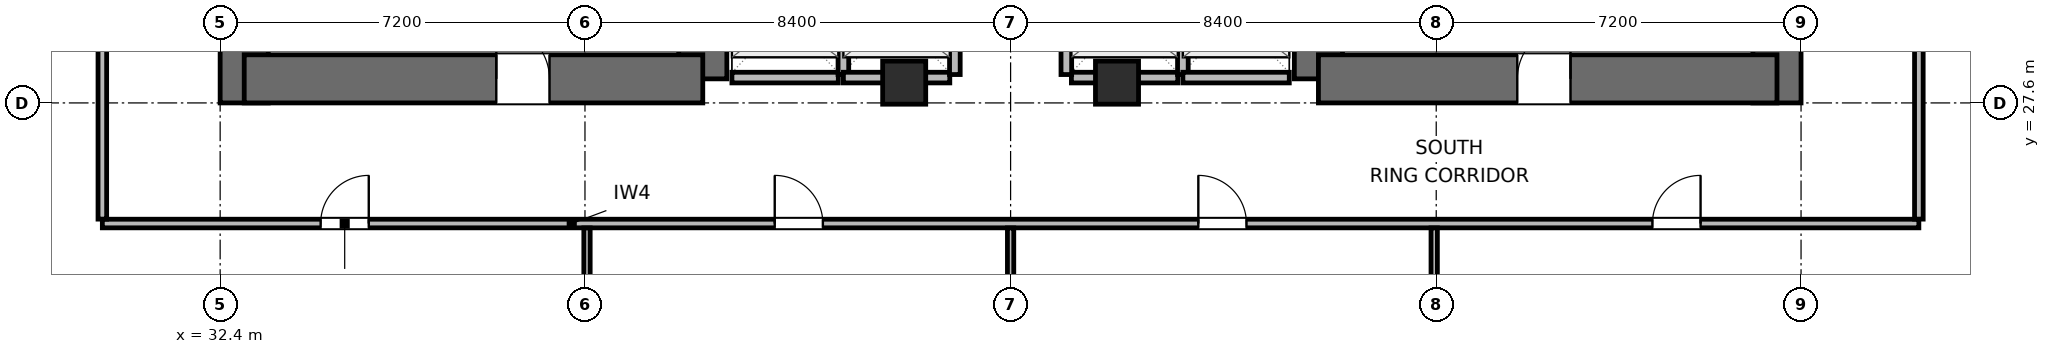
"""IFC4 building model, lengths in metres.
Left out: names, types, materials, properties, quantities, classifications, styles, units other than length and angle.
Written with IfcOpenShell. Run it as: python <this file> out.ifc"""

import sys

from ifc_helpers import new_model, si_unit, direction, frame, frame_2d, origin, origin_2d, place, context, subcontext, project, spatial, rectangle, extrude, element, fill, save


model = new_model("IFC4")
c1 = context("Model", 3, precision=1e-05, world=origin(), true_north=direction((0.0, 1.0)))
c2 = subcontext(c1, "Body", "Model", "MODEL_VIEW")
j1 = project(units=[si_unit("LENGTHUNIT", "METRE"), si_unit("PLANEANGLEUNIT", "RADIAN")], contexts=[c1])
p1 = place(None, origin())
s1 = spatial("IfcSite", under=j1, at=p1, CompositionType="ELEMENT")
p2 = place(p1, origin())
s2 = spatial("IfcBuilding", under=s1, at=p2, CompositionType="ELEMENT")
p3 = place(p2, frame((0.0, 0.0, 41.1)))
s3 = spatial("IfcBuildingStorey", under=s2, at=p3, CompositionType="ELEMENT", Elevation=41.1)
p4 = place(p3, frame((32.875, 27.6, 0.0), z_axis=(0.0, 0.0, 1.0), x_axis=(0.0, 1.0, 0.0)))
e1 = element("IfcWall", 1, at=p4, inside=s3, PredefinedType="SHEAR", context=c2, shape_type="SweptSolid", body=[
    extrude(rectangle(XDim=16.8, YDim=0.95, at=frame_2d((8.4, 0.0))), origin(), (0.0, 0.0, 1.0), 3.9),
])
p5 = place(p3, frame((41.925, 28.075, 0.0), z_axis=(0.0, 0.0, 1.0), x_axis=(0.0, 1.0, 0.0)))
e2 = element("IfcWall", 2, at=p5, inside=s3, PredefinedType="SHEAR", context=c2, shape_type="SweptSolid", body=[
    extrude(rectangle(XDim=6.325, YDim=0.95, at=frame_2d((3.163, 0.0))), origin(), (0.0, 0.0, 1.0), 3.9),
])
p6 = place(p3, frame((32.875, 28.075, 0.0), z_axis=(0.0, 0.0, 1.0), x_axis=(1.0, 0.0, 0.0)))
e3 = element("IfcWall", 3, at=p6, inside=s3, PredefinedType="SHEAR", context=c2, shape_type="SweptSolid", body=[
    extrude(rectangle(XDim=9.05, YDim=0.95, at=frame_2d((4.525, 0.0))), origin(), (0.0, 0.0, 1.0), 3.9),
])
p7 = place(p6, frame((4.975, 0.0, 0.0)))
e4 = element("IfcOpeningElement", 4, at=p7, cuts=e3, PredefinedType="OPENING", context=c2, shape_type="SweptSolid", body=[
    extrude(rectangle(XDim=1.05, YDim=2.04, at=frame_2d((0.525, 1.02))), frame((0.0, 0.485, 0.0), z_axis=(0.0, -1.0, 0.0), x_axis=(1.0, 0.0, 0.0)), (0.0, 0.0, 1.0), 0.97),
])
p8 = place(p3, frame((54.075, 28.075, 0.0), z_axis=(0.0, 0.0, 1.0), x_axis=(0.0, 1.0, 0.0)))
e5 = element("IfcWall", 5, at=p8, inside=s3, PredefinedType="SHEAR", context=c2, shape_type="SweptSolid", body=[
    extrude(rectangle(XDim=7.725, YDim=0.95, at=frame_2d((3.863, 0.0))), origin(), (0.0, 0.0, 1.0), 3.9),
])
p9 = place(p3, frame((63.125, 27.6, 0.0), z_axis=(0.0, 0.0, 1.0), x_axis=(0.0, 1.0, 0.0)))
e6 = element("IfcWall", 6, at=p9, inside=s3, PredefinedType="SHEAR", context=c2, shape_type="SweptSolid", body=[
    extrude(rectangle(XDim=16.8, YDim=0.95, at=frame_2d((8.4, 0.0))), origin(), (0.0, 0.0, 1.0), 3.9),
])
p10 = place(p3, frame((54.075, 28.075, 0.0), z_axis=(0.0, 0.0, 1.0), x_axis=(1.0, 0.0, 0.0)))
e7 = element("IfcWall", 7, at=p10, inside=s3, PredefinedType="SHEAR", context=c2, shape_type="SweptSolid", body=[
    extrude(rectangle(XDim=9.05, YDim=0.95, at=frame_2d((4.525, 0.0))), origin(), (0.0, 0.0, 1.0), 3.9),
])
p11 = place(p10, frame((3.925, 0.0, 0.0)))
e8 = element("IfcOpeningElement", 8, at=p11, cuts=e7, PredefinedType="OPENING", context=c2, shape_type="SweptSolid", body=[
    extrude(rectangle(XDim=1.05, YDim=2.04, at=frame_2d((0.525, 1.02))), frame((0.0, 0.485, 0.0), z_axis=(0.0, -1.0, 0.0), x_axis=(1.0, 0.0, 0.0)), (0.0, 0.0, 1.0), 0.97),
])
for number, where, z_axis, x_axis in (
    (9, (45.9, 28.0, 0.0), (0.0, 0.0, 1.0), (1.0, 0.0, 0.0)),
    (10, (50.1, 28.0, 0.0), (0.0, 0.0, 1.0), (1.0, 0.0, 0.0)),
):
    element("IfcColumn", number, at=place(p3, frame(where, z_axis=z_axis, x_axis=x_axis)), inside=s3, PredefinedType="COLUMN", context=c2, shape_type="SweptSolid", body=[
        extrude(rectangle(XDim=0.85, YDim=0.85, at=origin_2d()), origin(), (0.0, 0.0, 1.0), 3.9),
    ])
p12 = place(p3, frame((42.5, 28.1, 0.0), z_axis=(0.0, 0.0, 1.0), x_axis=(1.0, 0.0, 0.0)))
e11 = element("IfcWall", 11, at=p12, inside=s3, PredefinedType="PARTITIONING", context=c2, shape_type="SweptSolid", body=[
    extrude(rectangle(XDim=2.1, YDim=0.21, at=frame_2d((1.05, 0.0))), origin(), (0.0, 0.0, 1.0), 2.525),
])
p13 = place(p3, frame((44.7, 28.16, 0.0), z_axis=(0.0, 0.0, 1.0), x_axis=(0.0, 1.0, 0.0)))
e12 = element("IfcWall", 12, at=p13, inside=s3, PredefinedType="PARTITIONING", context=c2, shape_type="SweptSolid", body=[
    extrude(rectangle(XDim=2.28, YDim=0.21, at=frame_2d((1.14, 0.0))), origin(), (0.0, 0.0, 1.0), 3.64),
])
p14 = place(p3, frame((44.7, 28.1, 0.0), z_axis=(0.0, 0.0, 1.0), x_axis=(1.0, 0.0, 0.0)))
e13 = element("IfcWall", 13, at=p14, inside=s3, PredefinedType="PARTITIONING", context=c2, shape_type="SweptSolid", body=[
    extrude(rectangle(XDim=2.1, YDim=0.21, at=frame_2d((1.05, 0.0))), origin(), (0.0, 0.0, 1.0), 2.525),
])
p15 = place(p3, frame((46.9, 28.16, 0.0), z_axis=(0.0, 0.0, 1.0), x_axis=(0.0, 1.0, 0.0)))
e14 = element("IfcWall", 14, at=p15, inside=s3, PredefinedType="PARTITIONING", context=c2, shape_type="SweptSolid", body=[
    extrude(rectangle(XDim=2.28, YDim=0.21, at=frame_2d((1.14, 0.0))), origin(), (0.0, 0.0, 1.0), 3.64),
])
p16 = place(p3, frame((49.2, 28.1, 0.0), z_axis=(0.0, 0.0, 1.0), x_axis=(1.0, 0.0, 0.0)))
e15 = element("IfcWall", 15, at=p16, inside=s3, PredefinedType="PARTITIONING", context=c2, shape_type="SweptSolid", body=[
    extrude(rectangle(XDim=2.1, YDim=0.21, at=frame_2d((1.05, 0.0))), origin(), (0.0, 0.0, 1.0), 2.525),
])
for number, where, z_axis, x_axis in (
    (16, (49.1, 28.16, 0.0), (0.0, 0.0, 1.0), (0.0, 1.0, 0.0)),
    (17, (51.4, 28.16, 0.0), (0.0, 0.0, 1.0), (0.0, 1.0, 0.0)),
):
    element("IfcWall", number, at=place(p3, frame(where, z_axis=z_axis, x_axis=x_axis)), inside=s3, PredefinedType="PARTITIONING", context=c2, shape_type="SweptSolid", body=[
        extrude(rectangle(XDim=2.28, YDim=0.21, at=frame_2d((1.14, 0.0))), origin(), (0.0, 0.0, 1.0), 3.64),
    ])
p17 = place(p3, frame((51.4, 28.1, 0.0), z_axis=(0.0, 0.0, 1.0), x_axis=(1.0, 0.0, 0.0)))
e18 = element("IfcWall", 18, at=p17, inside=s3, PredefinedType="PARTITIONING", context=c2, shape_type="SweptSolid", body=[
    extrude(rectangle(XDim=2.1, YDim=0.21, at=frame_2d((1.05, 0.0))), origin(), (0.0, 0.0, 1.0), 2.525),
])
p18 = place(p3, frame((30.075, 25.22, 0.0), z_axis=(0.0, 0.0, 1.0), x_axis=(1.0, 0.0, 0.0)))
e19 = element("IfcWall", 19, at=p18, inside=s3, PredefinedType="PARTITIONING", context=c2, shape_type="SweptSolid", body=[
    extrude(rectangle(XDim=35.85, YDim=0.17, at=frame_2d((17.925, 0.0))), origin(), (0.0, 0.0, 1.0), 3.64),
])
p19 = place(p18, frame((4.308, 0.0, 0.0)))
e20 = element("IfcOpeningElement", 20, at=p19, cuts=e19, PredefinedType="OPENING", context=c2, shape_type="SweptSolid", body=[
    extrude(rectangle(XDim=0.95, YDim=2.04, at=frame_2d((0.475, 1.02))), frame((0.0, 0.095, 0.0), z_axis=(0.0, -1.0, 0.0), x_axis=(1.0, 0.0, 0.0)), (0.0, 0.0, 1.0), 0.19),
])
p20 = place(p18, frame((13.27, 0.0, 0.0)))
e21 = element("IfcOpeningElement", 21, at=p20, cuts=e19, PredefinedType="OPENING", context=c2, shape_type="SweptSolid", body=[
    extrude(rectangle(XDim=0.95, YDim=2.04, at=frame_2d((0.475, 1.02))), frame((0.0, 0.095, 0.0), z_axis=(0.0, -1.0, 0.0), x_axis=(1.0, 0.0, 0.0)), (0.0, 0.0, 1.0), 0.19),
])
p21 = place(p18, frame((21.63, 0.0, 0.0)))
e22 = element("IfcOpeningElement", 22, at=p21, cuts=e19, PredefinedType="OPENING", context=c2, shape_type="SweptSolid", body=[
    extrude(rectangle(XDim=0.95, YDim=2.04, at=frame_2d((0.475, 1.02))), frame((0.0, 0.095, 0.0), z_axis=(0.0, -1.0, 0.0), x_axis=(1.0, 0.0, 0.0)), (0.0, 0.0, 1.0), 0.19),
])
p22 = place(p18, frame((30.592, 0.0, 0.0)))
e23 = element("IfcOpeningElement", 23, at=p22, cuts=e19, PredefinedType="OPENING", context=c2, shape_type="SweptSolid", body=[
    extrude(rectangle(XDim=0.95, YDim=2.04, at=frame_2d((0.475, 1.02))), frame((0.0, 0.095, 0.0), z_axis=(0.0, -1.0, 0.0), x_axis=(1.0, 0.0, 0.0)), (0.0, 0.0, 1.0), 0.19),
])
p23 = place(p3, frame((30.075, 25.307, 0.0), z_axis=(0.0, 0.0, 1.0), x_axis=(0.0, 1.0, 0.0)))
e24 = element("IfcWall", 24, at=p23, inside=s3, PredefinedType="PARTITIONING", context=c2, shape_type="SweptSolid", body=[
    extrude(rectangle(XDim=21.386, YDim=0.17, at=frame_2d((10.693, 0.0))), origin(), (0.0, 0.0, 1.0), 3.64),
])
p24 = place(p23, frame((3.528, 0.0, 0.0)))
e25 = element("IfcOpeningElement", 25, at=p24, cuts=e24, PredefinedType="OPENING", context=c2, shape_type="SweptSolid", body=[
    extrude(rectangle(XDim=0.95, YDim=2.04, at=frame_2d((0.475, 1.02))), frame((0.0, 0.095, 0.0), z_axis=(0.0, -1.0, 0.0), x_axis=(1.0, 0.0, 0.0)), (0.0, 0.0, 1.0), 0.19),
])
p25 = place(p23, frame((10.818, 0.0, 0.0)))
e26 = element("IfcOpeningElement", 26, at=p25, cuts=e24, PredefinedType="OPENING", context=c2, shape_type="SweptSolid", body=[
    extrude(rectangle(XDim=0.95, YDim=2.04, at=frame_2d((0.475, 1.02))), frame((0.0, 0.095, 0.0), z_axis=(0.0, -1.0, 0.0), x_axis=(1.0, 0.0, 0.0)), (0.0, 0.0, 1.0), 0.19),
])
p26 = place(p23, frame((17.508, 0.0, 0.0)))
e27 = element("IfcOpeningElement", 27, at=p26, cuts=e24, PredefinedType="OPENING", context=c2, shape_type="SweptSolid", body=[
    extrude(rectangle(XDim=0.95, YDim=2.04, at=frame_2d((0.475, 1.02))), frame((0.0, 0.095, 0.0), z_axis=(0.0, -1.0, 0.0), x_axis=(1.0, 0.0, 0.0)), (0.0, 0.0, 1.0), 0.19),
])
p27 = place(p3, frame((65.925, 25.307, 0.0), z_axis=(0.0, 0.0, 1.0), x_axis=(0.0, 1.0, 0.0)))
e28 = element("IfcWall", 28, at=p27, inside=s3, PredefinedType="PARTITIONING", context=c2, shape_type="SweptSolid", body=[
    extrude(rectangle(XDim=21.386, YDim=0.17, at=frame_2d((10.693, 0.0))), origin(), (0.0, 0.0, 1.0), 3.64),
])
p28 = place(p27, frame((5.428, 0.0, 0.0)))
e29 = element("IfcOpeningElement", 29, at=p28, cuts=e28, PredefinedType="OPENING", context=c2, shape_type="SweptSolid", body=[
    extrude(rectangle(XDim=0.95, YDim=2.04, at=frame_2d((0.475, 1.02))), frame((0.0, 0.095, 0.0), z_axis=(0.0, -1.0, 0.0), x_axis=(1.0, 0.0, 0.0)), (0.0, 0.0, 1.0), 0.19),
])
p29 = place(p27, frame((16.208, 0.0, 0.0)))
e30 = element("IfcOpeningElement", 30, at=p29, cuts=e28, PredefinedType="OPENING", context=c2, shape_type="SweptSolid", body=[
    extrude(rectangle(XDim=0.95, YDim=2.04, at=frame_2d((0.475, 1.02))), frame((0.0, 0.095, 0.0), z_axis=(0.0, -1.0, 0.0), x_axis=(1.0, 0.0, 0.0)), (0.0, 0.0, 1.0), 0.19),
])
p30 = place(p3, frame((39.64, 9.915, 0.0), z_axis=(0.0, 0.0, 1.0), x_axis=(0.0, 1.0, 0.0)))
e31 = element("IfcWall", 31, at=p30, inside=s3, PredefinedType="PARTITIONING", context=c2, shape_type="SweptSolid", body=[
    extrude(rectangle(XDim=15.218, YDim=0.125, at=frame_2d((7.609, 0.0))), origin(), (0.0, 0.0, 1.0), 2.93),
])
p31 = place(p3, frame((48.0, 11.515, 0.0), z_axis=(0.0, 0.0, 1.0), x_axis=(0.0, 1.0, 0.0)))
e32 = element("IfcWall", 32, at=p31, inside=s3, PredefinedType="PARTITIONING", context=c2, shape_type="SweptSolid", body=[
    extrude(rectangle(XDim=13.618, YDim=0.125, at=frame_2d((6.809, 0.0))), origin(), (0.0, 0.0, 1.0), 2.93),
])
p32 = place(p3, frame((56.36, 9.915, 0.0), z_axis=(0.0, 0.0, 1.0), x_axis=(0.0, 1.0, 0.0)))
e33 = element("IfcWall", 33, at=p32, inside=s3, PredefinedType="PARTITIONING", context=c2, shape_type="SweptSolid", body=[
    extrude(rectangle(XDim=15.218, YDim=0.125, at=frame_2d((7.609, 0.0))), origin(), (0.0, 0.0, 1.0), 2.93),
])
p33 = place(p7, origin())
e34 = element("IfcDoor", 34, at=p33, inside=s3, OperationType="SINGLE_SWING_LEFT", PredefinedType="DOOR", context=c2, shape_type="SweptSolid", body=[
    extrude(rectangle(XDim=1.05, YDim=2.04, at=frame_2d((0.525, 1.02))), frame((0.0, 0.025, 0.0), z_axis=(0.0, -1.0, 0.0), x_axis=(1.0, 0.0, 0.0)), (0.0, 0.0, 1.0), 0.05),
])
fill(e4, e34)
p34 = place(p11, origin())
e35 = element("IfcDoor", 35, at=p34, inside=s3, OperationType="SINGLE_SWING_RIGHT", PredefinedType="DOOR", context=c2, shape_type="SweptSolid", body=[
    extrude(rectangle(XDim=1.05, YDim=2.04, at=frame_2d((0.525, 1.02))), frame((0.0, 0.025, 0.0), z_axis=(0.0, -1.0, 0.0), x_axis=(1.0, 0.0, 0.0)), (0.0, 0.0, 1.0), 0.05),
])
fill(e8, e35)
p35 = place(p19, origin())
e36 = element("IfcDoor", 36, at=p35, inside=s3, OperationType="SINGLE_SWING_RIGHT", PredefinedType="DOOR", context=c2, shape_type="SweptSolid", body=[
    extrude(rectangle(XDim=0.95, YDim=2.04, at=frame_2d((0.475, 1.02))), frame((0.0, 0.025, 0.0), z_axis=(0.0, -1.0, 0.0), x_axis=(1.0, 0.0, 0.0)), (0.0, 0.0, 1.0), 0.05),
])
fill(e20, e36)
p36 = place(p20, origin())
e37 = element("IfcDoor", 37, at=p36, inside=s3, OperationType="SINGLE_SWING_LEFT", PredefinedType="DOOR", context=c2, shape_type="SweptSolid", body=[
    extrude(rectangle(XDim=0.95, YDim=2.04, at=frame_2d((0.475, 1.02))), frame((0.0, 0.025, 0.0), z_axis=(0.0, -1.0, 0.0), x_axis=(1.0, 0.0, 0.0)), (0.0, 0.0, 1.0), 0.05),
])
fill(e21, e37)
p37 = place(p21, origin())
e38 = element("IfcDoor", 38, at=p37, inside=s3, OperationType="SINGLE_SWING_LEFT", PredefinedType="DOOR", context=c2, shape_type="SweptSolid", body=[
    extrude(rectangle(XDim=0.95, YDim=2.04, at=frame_2d((0.475, 1.02))), frame((0.0, 0.025, 0.0), z_axis=(0.0, -1.0, 0.0), x_axis=(1.0, 0.0, 0.0)), (0.0, 0.0, 1.0), 0.05),
])
fill(e22, e38)
p38 = place(p22, origin())
e39 = element("IfcDoor", 39, at=p38, inside=s3, OperationType="SINGLE_SWING_RIGHT", PredefinedType="DOOR", context=c2, shape_type="SweptSolid", body=[
    extrude(rectangle(XDim=0.95, YDim=2.04, at=frame_2d((0.475, 1.02))), frame((0.0, 0.025, 0.0), z_axis=(0.0, -1.0, 0.0), x_axis=(1.0, 0.0, 0.0)), (0.0, 0.0, 1.0), 0.05),
])
fill(e23, e39)
save(model, sys.argv[1])
